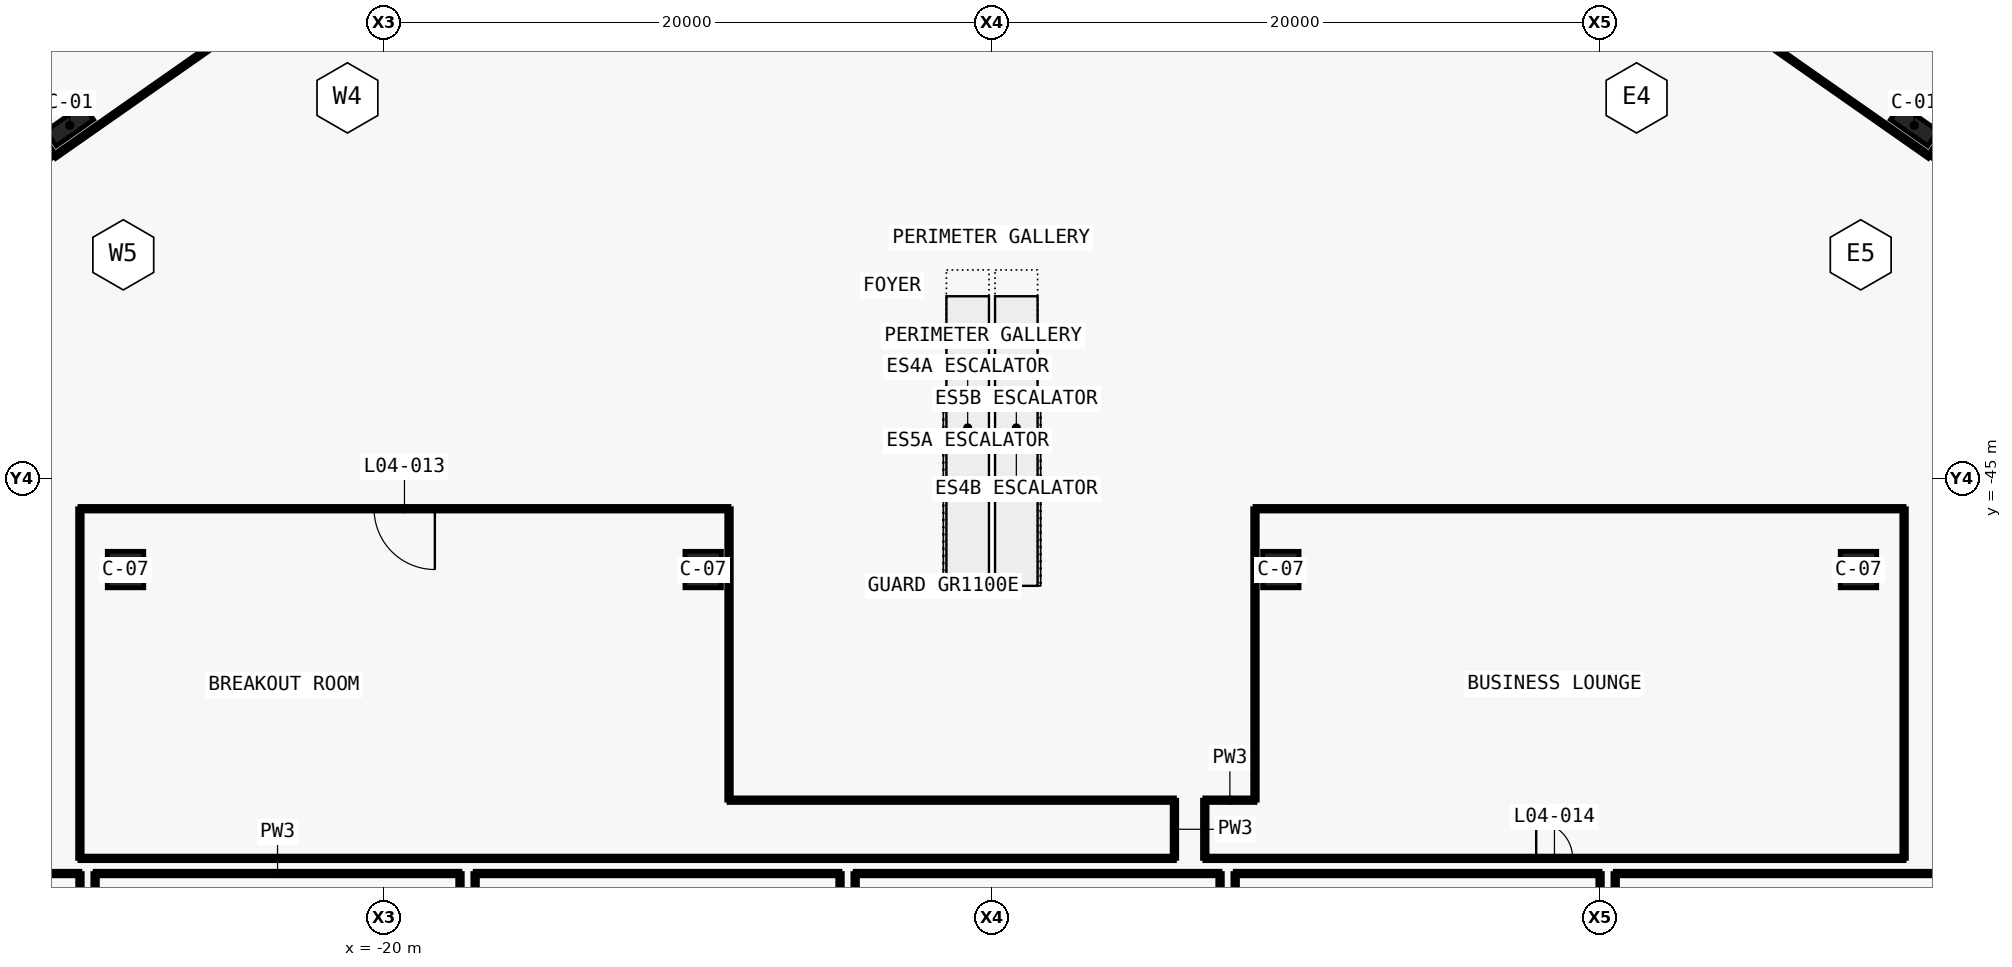
"""IFC4 building model, lengths in metres.
Left out: names, types, materials, properties, quantities, classifications, styles, units other than length and angle.
Written with IfcOpenShell. Run it as: python <this file> out.ifc"""

import sys

from ifc_helpers import new_model, si_unit, direction, frame, frame_2d, origin, origin_2d, place, context, subcontext, project, spatial, rectangle, extrude, element, fill, save


model = new_model("IFC4")
c1 = context("Model", 3, precision=1e-05, world=origin(), true_north=direction((0.0, 1.0)))
c2 = subcontext(c1, "Body", "Model", "MODEL_VIEW")
j1 = project(units=[si_unit("LENGTHUNIT", "METRE"), si_unit("PLANEANGLEUNIT", "RADIAN")], contexts=[c1])
p1 = place(None, origin())
s1 = spatial("IfcSite", under=j1, at=p1, CompositionType="ELEMENT")
p2 = place(p1, origin())
s2 = spatial("IfcBuilding", under=s1, at=p2, CompositionType="ELEMENT")
p3 = place(p2, frame((0.0, 0.0, 32.0)))
s3 = spatial("IfcBuildingStorey", under=s2, at=p3, CompositionType="ELEMENT", Elevation=32.0)
for number, where, z_axis, x_axis in (
    (1, (-30.336, -33.388, 0.0), (0.0, 0.0, 1.0), (-0.819, -0.574, 0.0)),
    (2, (30.336, -33.388, 0.0), (0.0, 0.0, 1.0), (0.819, -0.574, 0.0)),
):
    element("IfcColumn", number, at=place(p3, frame(where, z_axis=z_axis, x_axis=x_axis)), inside=s3, PredefinedType="COLUMN", context=c2, shape_type="SweptSolid", body=[
        extrude(rectangle(XDim=1.5, YDim=0.6, at=origin_2d()), origin(), (0.0, 0.0, 1.0), 5.5),
    ])
for number, where, z_axis, x_axis in (
    (3, (-28.5, -48.0, 0.0), (0.0, 0.0, 1.0), (1.0, 0.0, 0.0)),
    (4, (-9.5, -48.0, 0.0), (0.0, 0.0, 1.0), (1.0, 0.0, 0.0)),
    (5, (9.5, -48.0, 0.0), (0.0, 0.0, 1.0), (1.0, 0.0, 0.0)),
    (6, (28.5, -48.0, 0.0), (0.0, 0.0, 1.0), (1.0, 0.0, 0.0)),
):
    element("IfcColumn", number, at=place(p3, frame(where, z_axis=z_axis, x_axis=x_axis)), inside=s3, PredefinedType="COLUMN", context=c2, shape_type="SweptSolid", body=[
        extrude(rectangle(XDim=1.2, YDim=1.2, at=origin_2d()), origin(), (0.0, 0.0, 1.0), 5.5),
    ])
p4 = place(p3, frame((32.56, -31.955, 0.0), z_axis=(0.0, 0.0, 1.0), x_axis=(-0.573560650686, -0.819163097304, 0.0)))
e7 = element("IfcWall", 7, at=p4, inside=s3, PredefinedType="PARTITIONING", context=c2, shape_type="SweptSolid", body=[
    extrude(rectangle(XDim=3.0, YDim=0.15, at=frame_2d((1.5, 0.0))), origin(), (0.0, 0.0, 1.0), 3.88),
])
p5 = place(p3, frame((30.839, -34.412, 0.0), z_axis=(0.0, 0.0, 1.0), x_axis=(-0.81915226268, 0.573576124456, 0.0)))
e8 = element("IfcWall", 8, at=p5, inside=s3, PredefinedType="PARTITIONING", context=c2, shape_type="SweptSolid", body=[
    extrude(rectangle(XDim=18.0, YDim=0.15, at=frame_2d((9.0, 0.0))), origin(), (0.0, 0.0, 1.0), 5.1),
])
p6 = place(p3, frame((-29.999, -68.6, 0.0), z_axis=(0.0, 0.0, 1.0), x_axis=(0.0, 1.0, 0.0)))
e9 = element("IfcWall", 9, at=p6, inside=s3, PredefinedType="PARTITIONING", context=c2, shape_type="SweptSolid", body=[
    extrude(rectangle(XDim=10.6, YDim=0.15, at=frame_2d((5.3, 0.0))), origin(), (0.0, 0.0, 1.0), 4.28),
])
p7 = place(p3, frame((-30.0, -57.999, 0.0), z_axis=(0.0, 0.0, 1.0), x_axis=(-1.0, 0.0, 0.0)))
e10 = element("IfcWall", 10, at=p7, inside=s3, PredefinedType="PARTITIONING", context=c2, shape_type="SweptSolid", body=[
    extrude(rectangle(XDim=6.599, YDim=0.15, at=frame_2d((3.3, 0.0))), origin(), (0.0, 0.0, 1.0), 5.1),
])
p8 = place(p3, frame((-17.499, -68.599, 0.0), z_axis=(0.0, 0.0, 1.0), x_axis=(0.0, 1.0, 0.0)))
e11 = element("IfcWall", 11, at=p8, inside=s3, PredefinedType="PARTITIONING", context=c2, shape_type="SweptSolid", body=[
    extrude(rectangle(XDim=10.599, YDim=0.15, at=frame_2d((5.3, 0.0))), origin(), (0.0, 0.0, 1.0), 4.28),
])
p9 = place(p8, frame((4.399, 0.0, 0.0)))
e12 = element("IfcOpeningElement", 12, at=p9, cuts=e11, PredefinedType="OPENING", context=c2, shape_type="SweptSolid", body=[
    extrude(rectangle(XDim=1.8, YDim=2.4, at=frame_2d((0.9, 1.2))), frame((0.0, 0.085, 0.0), z_axis=(0.0, -1.0, 0.0), x_axis=(1.0, 0.0, 0.0)), (0.0, 0.0, 1.0), 0.17),
])
for number, where, z_axis, x_axis in (
    (13, (-17.5, -57.999, 0.0), (0.0, 0.0, 1.0), (-1.0, 0.0, 0.0)),
    (14, (-29.501, -58.0, 0.0), (0.0, 0.0, 1.0), (0.0, -1.0, 0.0)),
):
    element("IfcWall", number, at=place(p3, frame(where, z_axis=z_axis, x_axis=x_axis)), inside=s3, PredefinedType="PARTITIONING", context=c2, shape_type="SweptSolid", body=[
        extrude(rectangle(XDim=12.0, YDim=0.15, at=frame_2d((6.0, 0.0))), origin(), (0.0, 0.0, 1.0), 4.28),
    ])
p10 = place(p3, frame((-4.999, -68.599, 0.0), z_axis=(0.0, 0.0, 1.0), x_axis=(0.0, 1.0, 0.0)))
e15 = element("IfcWall", 15, at=p10, inside=s3, PredefinedType="PARTITIONING", context=c2, shape_type="SweptSolid", body=[
    extrude(rectangle(XDim=10.599, YDim=0.15, at=frame_2d((5.3, 0.0))), origin(), (0.0, 0.0, 1.0), 4.28),
])
p11 = place(p10, frame((4.399, 0.0, 0.0)))
e16 = element("IfcOpeningElement", 16, at=p11, cuts=e15, PredefinedType="OPENING", context=c2, shape_type="SweptSolid", body=[
    extrude(rectangle(XDim=1.8, YDim=2.4, at=frame_2d((0.9, 1.2))), frame((0.0, 0.085, 0.0), z_axis=(0.0, -1.0, 0.0), x_axis=(1.0, 0.0, 0.0)), (0.0, 0.0, 1.0), 0.17),
])
p12 = place(p3, frame((-5.0, -57.999, 0.0), z_axis=(0.0, 0.0, 1.0), x_axis=(-1.0, 0.0, 0.0)))
e17 = element("IfcWall", 17, at=p12, inside=s3, PredefinedType="PARTITIONING", context=c2, shape_type="SweptSolid", body=[
    extrude(rectangle(XDim=12.0, YDim=0.15, at=frame_2d((6.0, 0.0))), origin(), (0.0, 0.0, 1.0), 4.28),
])
for number, where, z_axis, x_axis in (
    (18, (-17.001, -58.0, 0.0), (0.0, 0.0, 1.0), (0.0, -1.0, 0.0)),
    (19, (7.501, -68.599, 0.0), (0.0, 0.0, 1.0), (0.0, 1.0, 0.0)),
):
    element("IfcWall", number, at=place(p3, frame(where, z_axis=z_axis, x_axis=x_axis)), inside=s3, PredefinedType="PARTITIONING", context=c2, shape_type="SweptSolid", body=[
        extrude(rectangle(XDim=10.599, YDim=0.15, at=frame_2d((5.3, 0.0))), origin(), (0.0, 0.0, 1.0), 4.28),
    ])
p13 = place(p3, frame((7.5, -57.999, 0.0), z_axis=(0.0, 0.0, 1.0), x_axis=(-1.0, 0.0, 0.0)))
e20 = element("IfcWall", 20, at=p13, inside=s3, PredefinedType="PARTITIONING", context=c2, shape_type="SweptSolid", body=[
    extrude(rectangle(XDim=12.0, YDim=0.15, at=frame_2d((6.0, 0.0))), origin(), (0.0, 0.0, 1.0), 5.1),
])
p14 = place(p3, frame((-4.501, -58.0, 0.0), z_axis=(0.0, 0.0, 1.0), x_axis=(0.0, -1.0, 0.0)))
e21 = element("IfcWall", 21, at=p14, inside=s3, PredefinedType="PARTITIONING", context=c2, shape_type="SweptSolid", body=[
    extrude(rectangle(XDim=10.599, YDim=0.15, at=frame_2d((5.3, 0.0))), origin(), (0.0, 0.0, 1.0), 4.28),
])
p15 = place(p3, frame((20.001, -68.599, 0.0), z_axis=(0.0, 0.0, 1.0), x_axis=(0.0, 1.0, 0.0)))
e22 = element("IfcWall", 22, at=p15, inside=s3, PredefinedType="PARTITIONING", context=c2, shape_type="SweptSolid", body=[
    extrude(rectangle(XDim=10.599, YDim=0.15, at=frame_2d((5.3, 0.0))), origin(), (0.0, 0.0, 1.0), 4.28),
])
p16 = place(p15, frame((4.399, 0.0, 0.0)))
e23 = element("IfcOpeningElement", 23, at=p16, cuts=e22, PredefinedType="OPENING", context=c2, shape_type="SweptSolid", body=[
    extrude(rectangle(XDim=1.8, YDim=2.4, at=frame_2d((0.9, 1.2))), frame((0.0, 0.085, 0.0), z_axis=(0.0, -1.0, 0.0), x_axis=(1.0, 0.0, 0.0)), (0.0, 0.0, 1.0), 0.17),
])
p17 = place(p3, frame((20.0, -57.999, 0.0), z_axis=(0.0, 0.0, 1.0), x_axis=(-1.0, 0.0, 0.0)))
e24 = element("IfcWall", 24, at=p17, inside=s3, PredefinedType="PARTITIONING", context=c2, shape_type="SweptSolid", body=[
    extrude(rectangle(XDim=12.0, YDim=0.15, at=frame_2d((6.0, 0.0))), origin(), (0.0, 0.0, 1.0), 4.28),
])
p18 = place(p3, frame((7.999, -58.0, 0.0), z_axis=(0.0, 0.0, 1.0), x_axis=(0.0, -1.0, 0.0)))
e25 = element("IfcWall", 25, at=p18, inside=s3, PredefinedType="PARTITIONING", context=c2, shape_type="SweptSolid", body=[
    extrude(rectangle(XDim=10.599, YDim=0.15, at=frame_2d((5.3, 0.0))), origin(), (0.0, 0.0, 1.0), 4.28),
])
p19 = place(p3, frame((32.5, -57.999, 0.0), z_axis=(0.0, 0.0, 1.0), x_axis=(-1.0, 0.0, 0.0)))
e26 = element("IfcWall", 26, at=p19, inside=s3, PredefinedType="PARTITIONING", context=c2, shape_type="SweptSolid", body=[
    extrude(rectangle(XDim=12.0, YDim=0.15, at=frame_2d((6.0, 0.0))), origin(), (0.0, 0.0, 1.0), 4.28),
])
p20 = place(p3, frame((20.499, -58.0, 0.0), z_axis=(0.0, 0.0, 1.0), x_axis=(0.0, -1.0, 0.0)))
e27 = element("IfcWall", 27, at=p20, inside=s3, PredefinedType="PARTITIONING", context=c2, shape_type="SweptSolid", body=[
    extrude(rectangle(XDim=10.599, YDim=0.15, at=frame_2d((5.3, 0.0))), origin(), (0.0, 0.0, 1.0), 4.28),
])
p21 = place(p3, frame((-8.651, -45.999, 0.0), z_axis=(0.0, 0.0, 1.0), x_axis=(-1.0, 0.0, 0.0)))
e28 = element("IfcWall", 28, at=p21, inside=s3, PredefinedType="PARTITIONING", context=c2, shape_type="SweptSolid", body=[
    extrude(rectangle(XDim=21.349, YDim=0.15, at=frame_2d((10.675, 0.0))), origin(), (0.0, 0.0, 1.0), 4.08),
])
p22 = place(p21, frame((9.675, 0.0, 0.0)))
e29 = element("IfcOpeningElement", 29, at=p22, cuts=e28, PredefinedType="OPENING", context=c2, shape_type="SweptSolid", body=[
    extrude(rectangle(XDim=2.0, YDim=2.4, at=frame_2d((1.0, 1.2))), frame((0.0, 0.085, 0.0), z_axis=(0.0, -1.0, 0.0), x_axis=(1.0, 0.0, 0.0)), (0.0, 0.0, 1.0), 0.17),
])
p23 = place(p3, frame((-30.001, -46.0, 0.0), z_axis=(0.0, 0.0, 1.0), x_axis=(0.0, -1.0, 0.0)))
e30 = element("IfcWall", 30, at=p23, inside=s3, PredefinedType="PARTITIONING", context=c2, shape_type="SweptSolid", body=[
    extrude(rectangle(XDim=11.5, YDim=0.15, at=frame_2d((5.75, 0.0))), origin(), (0.0, 0.0, 1.0), 4.28),
])
p24 = place(p3, frame((-30.0, -57.501, 0.0), z_axis=(0.0, 0.0, 1.0), x_axis=(1.0, 0.0, 0.0)))
e31 = element("IfcWall", 31, at=p24, inside=s3, PredefinedType="PARTITIONING", context=c2, shape_type="SweptSolid", body=[
    extrude(rectangle(XDim=36.0, YDim=0.15, at=frame_2d((18.0, 0.0))), origin(), (0.0, 0.0, 1.0), 4.28),
])
for number, where, z_axis, x_axis in (
    (32, (6.001, -57.5, 0.0), (0.0, 0.0, 1.0), (0.0, 1.0, 0.0)),
    (33, (6.999, -55.587, 0.0), (0.0, 0.0, 1.0), (0.0, -1.0, 0.0)),
):
    element("IfcWall", number, at=place(p3, frame(where, z_axis=z_axis, x_axis=x_axis)), inside=s3, PredefinedType="PARTITIONING", context=c2, shape_type="SweptSolid", body=[
        extrude(rectangle(XDim=1.913, YDim=0.15, at=frame_2d((0.957, 0.0))), origin(), (0.0, 0.0, 1.0), 4.63),
    ])
p25 = place(p3, frame((7.0, -57.501, 0.0), z_axis=(0.0, 0.0, 1.0), x_axis=(1.0, 0.0, 0.0)))
e34 = element("IfcWall", 34, at=p25, inside=s3, PredefinedType="PARTITIONING", context=c2, shape_type="SweptSolid", body=[
    extrude(rectangle(XDim=23.0, YDim=0.15, at=frame_2d((11.5, 0.0))), origin(), (0.0, 0.0, 1.0), 4.28),
])
p26 = place(p25, frame((10.9, 0.0, 0.0)))
e35 = element("IfcOpeningElement", 35, at=p26, cuts=e34, PredefinedType="OPENING", context=c2, shape_type="SweptSolid", body=[
    extrude(rectangle(XDim=1.2, YDim=2.4, at=frame_2d((0.6, 1.2))), frame((0.0, 0.085, 0.0), z_axis=(0.0, -1.0, 0.0), x_axis=(1.0, 0.0, 0.0)), (0.0, 0.0, 1.0), 0.17),
])
p27 = place(p3, frame((30.001, -57.5, 0.0), z_axis=(0.0, 0.0, 1.0), x_axis=(0.0, 1.0, 0.0)))
e36 = element("IfcWall", 36, at=p27, inside=s3, PredefinedType="PARTITIONING", context=c2, shape_type="SweptSolid", body=[
    extrude(rectangle(XDim=11.5, YDim=0.15, at=frame_2d((5.75, 0.0))), origin(), (0.0, 0.0, 1.0), 4.28),
])
p28 = place(p3, frame((30.0, -45.999, 0.0), z_axis=(0.0, 0.0, 1.0), x_axis=(-1.0, 0.0, 0.0)))
e37 = element("IfcWall", 37, at=p28, inside=s3, PredefinedType="PARTITIONING", context=c2, shape_type="SweptSolid", body=[
    extrude(rectangle(XDim=21.349, YDim=0.15, at=frame_2d((10.675, 0.0))), origin(), (0.0, 0.0, 1.0), 4.08),
])
p29 = place(p3, frame((-32.56, -31.956, 0.0), z_axis=(0.0, 0.0, 1.0), x_axis=(0.573604390867, -0.819132469615, 0.0)))
e38 = element("IfcWall", 38, at=p29, inside=s3, PredefinedType="PARTITIONING", context=c2, shape_type="SweptSolid", body=[
    extrude(rectangle(XDim=2.999, YDim=0.15, at=frame_2d((1.5, 0.0))), origin(), (0.0, 0.0, 1.0), 3.88),
])
p30 = place(p3, frame((-30.839, -34.413, 0.0), z_axis=(0.0, 0.0, 1.0), x_axis=(0.819150779762, 0.573578242279, 0.0)))
e39 = element("IfcWall", 39, at=p30, inside=s3, PredefinedType="PARTITIONING", context=c2, shape_type="SweptSolid", body=[
    extrude(rectangle(XDim=27.002, YDim=0.15, at=frame_2d((13.501, 0.0))), origin(), (0.0, 0.0, 1.0), 4.08),
])
p31 = place(p3, frame((6.002, -55.586, 0.0), z_axis=(0.0, 0.0, 1.0), x_axis=(-1.0, 0.0, 0.0)))
e40 = element("IfcWall", 40, at=p31, inside=s3, PredefinedType="PARTITIONING", context=c2, shape_type="SweptSolid", body=[
    extrude(rectangle(XDim=14.652, YDim=0.15, at=frame_2d((7.326, 0.0))), origin(), (0.0, 0.0, 1.0), 5.1),
])
p32 = place(p3, frame((-8.65, -55.586, 0.0), z_axis=(0.0, 0.0, 1.0), x_axis=(0.0, 1.0, 0.0)))
e41 = element("IfcWall", 41, at=p32, inside=s3, PredefinedType="PARTITIONING", context=c2, shape_type="SweptSolid", body=[
    extrude(rectangle(XDim=9.588, YDim=0.15, at=frame_2d((4.794, 0.0))), origin(), (0.0, 0.0, 1.0), 4.28),
])
p33 = place(p3, frame((8.65, -55.586, 0.0), z_axis=(0.0, 0.0, 1.0), x_axis=(-1.0, 0.0, 0.0)))
e42 = element("IfcWall", 42, at=p33, inside=s3, PredefinedType="PARTITIONING", context=c2, shape_type="SweptSolid", body=[
    extrude(rectangle(XDim=1.652, YDim=0.15, at=frame_2d((0.826, 0.0))), origin(), (0.0, 0.0, 1.0), 5.1),
])
p34 = place(p3, frame((8.65, -45.998, 0.0), z_axis=(0.0, 0.0, 1.0), x_axis=(0.0, -1.0, 0.0)))
e43 = element("IfcWall", 43, at=p34, inside=s3, PredefinedType="PARTITIONING", context=c2, shape_type="SweptSolid", body=[
    extrude(rectangle(XDim=9.588, YDim=0.15, at=frame_2d((4.794, 0.0))), origin(), (0.0, 0.0, 1.0), 4.28),
])
p35 = place(p22, origin())
e44 = element("IfcDoor", 44, at=p35, inside=s3, OperationType="DOUBLE_DOOR_SINGLE_SWING", PredefinedType="DOOR", context=c2, shape_type="SweptSolid", body=[
    extrude(rectangle(XDim=2.0, YDim=2.4, at=frame_2d((1.0, 1.2))), frame((0.0, 0.025, 0.0), z_axis=(0.0, -1.0, 0.0), x_axis=(1.0, 0.0, 0.0)), (0.0, 0.0, 1.0), 0.05),
])
fill(e29, e44)
p36 = place(p26, origin())
e45 = element("IfcDoor", 45, at=p36, inside=s3, OperationType="DOUBLE_DOOR_SINGLE_SWING", PredefinedType="DOOR", context=c2, shape_type="SweptSolid", body=[
    extrude(rectangle(XDim=1.2, YDim=2.4, at=frame_2d((0.6, 1.2))), frame((0.0, 0.025, 0.0), z_axis=(0.0, -1.0, 0.0), x_axis=(1.0, 0.0, 0.0)), (0.0, 0.0, 1.0), 0.05),
])
fill(e35, e45)
save(model, sys.argv[1])
